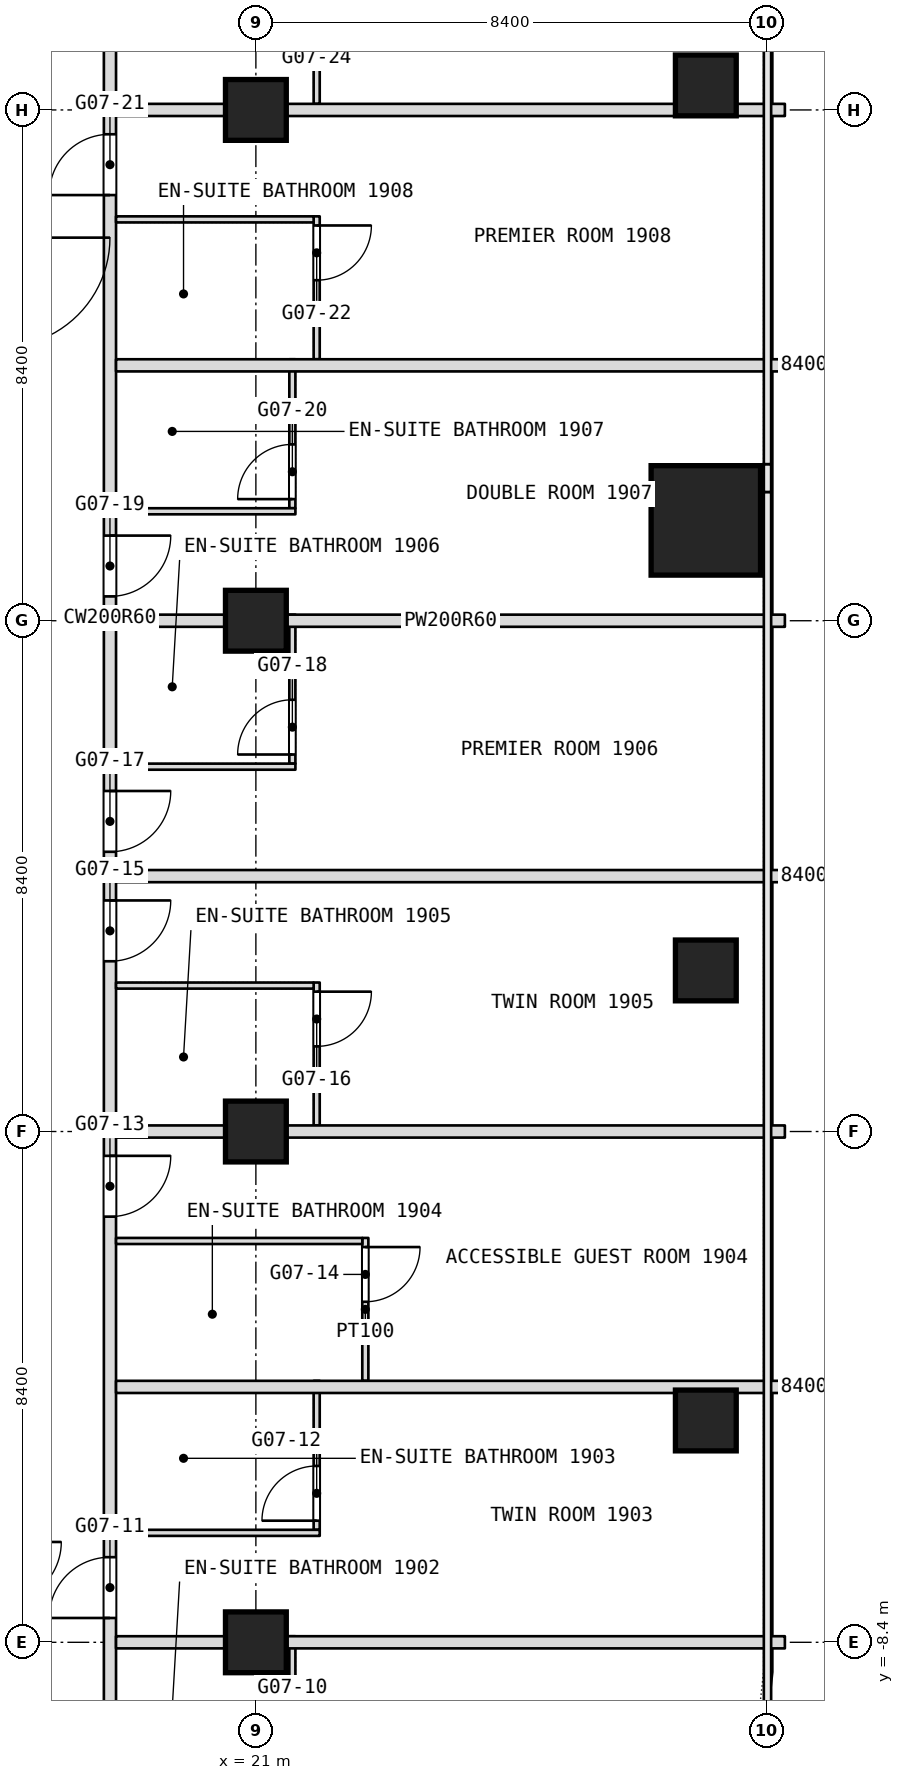
"""IFC4 building model, lengths in metres.
Left out: names, types, materials, properties, quantities, classifications, styles, units other than length and angle.
Written with IfcOpenShell. Run it as: python <this file> out.ifc"""

import sys

from ifc_helpers import new_model, si_unit, direction, frame, frame_2d, origin, origin_2d, place, context, subcontext, project, spatial, rectangle, extrude, element, fill, save


model = new_model("IFC4")
c1 = context("Model", 3, precision=1e-05, world=origin(), true_north=direction((0.0, 1.0)))
c2 = subcontext(c1, "Body", "Model", "MODEL_VIEW")
j1 = project(units=[si_unit("LENGTHUNIT", "METRE"), si_unit("PLANEANGLEUNIT", "RADIAN")], contexts=[c1])
p1 = place(None, origin())
s1 = spatial("IfcSite", under=j1, at=p1, CompositionType="ELEMENT")
p2 = place(p1, origin())
s2 = spatial("IfcBuilding", under=s1, at=p2, CompositionType="ELEMENT")
p3 = place(p2, frame((0.0, 0.0, 83.3)))
s3 = spatial("IfcBuildingStorey", under=s2, at=p3, CompositionType="ELEMENT", Elevation=83.3)
p4 = place(p3, frame((28.4, 10.05, 0.0), z_axis=(0.0, 0.0, 1.0), x_axis=(1.0, 0.0, 0.0)))
e1 = element("IfcColumn", 1, at=p4, inside=s3, PredefinedType="COLUMN", context=c2, shape_type="SweptSolid", body=[
    extrude(rectangle(XDim=1.8, YDim=1.8, at=origin_2d()), origin(), (0.0, 0.0, 1.0), 3.6),
])
for number, where, z_axis, x_axis in (
    (2, (21.0, -8.4, 0.0), (0.0, 0.0, 1.0), (1.0, 0.0, 0.0)),
    (3, (21.0, 0.0, 0.0), (0.0, 0.0, 1.0), (1.0, 0.0, 0.0)),
    (4, (21.0, 8.4, 0.0), (0.0, 0.0, 1.0), (1.0, 0.0, 0.0)),
    (5, (21.0, 16.8, 0.0), (0.0, 0.0, 1.0), (1.0, 0.0, 0.0)),
    (6, (28.4, 17.203, 0.0), (0.0, 0.0, 1.0), (1.0, 0.0, 0.0)),
    (7, (28.4, 2.649, 0.0), (0.0, 0.0, 1.0), (1.0, 0.0, 0.0)),
    (8, (28.4, -4.752, 0.0), (0.0, 0.0, 1.0), (1.0, 0.0, 0.0)),
):
    element("IfcColumn", number, at=place(p3, frame(where, z_axis=z_axis, x_axis=x_axis)), inside=s3, PredefinedType="COLUMN", context=c2, shape_type="SweptSolid", body=[
        extrude(rectangle(XDim=1.0, YDim=1.0, at=origin_2d()), origin(), (0.0, 0.0, 1.0), 3.6),
    ])
p5 = place(p3, frame((22.8, -4.1, 0.0), z_axis=(0.0, 0.0, 1.0), x_axis=(0.0, 1.0, 0.0)))
e9 = element("IfcWall", 9, at=p5, inside=s3, PredefinedType="PARTITIONING", context=c2, shape_type="SweptSolid", body=[
    extrude(rectangle(XDim=2.35, YDim=0.1, at=frame_2d((1.175, 0.0))), origin(), (0.0, 0.0, 1.0), 3.3),
])
p6 = place(p5, frame((1.3, 0.0, 0.0)))
e10 = element("IfcOpeningElement", 10, at=p6, cuts=e9, PredefinedType="OPENING", context=c2, shape_type="SweptSolid", body=[
    extrude(rectangle(XDim=0.9, YDim=2.1, at=frame_2d((0.45, 1.05))), frame((0.0, 0.05, 0.0), z_axis=(0.0, -1.0, 0.0), x_axis=(1.0, 0.0, 0.0)), (0.0, 0.0, 1.0), 0.1),
])
p7 = place(p3, frame((22.0, -6.55, 0.0), z_axis=(0.0, 0.0, 1.0), x_axis=(0.0, 1.0, 0.0)))
e11 = element("IfcWall", 11, at=p7, inside=s3, PredefinedType="PARTITIONING", context=c2, shape_type="SweptSolid", body=[
    extrude(rectangle(XDim=2.45, YDim=0.1, at=frame_2d((1.225, 0.0))), origin(), (0.0, 0.0, 1.0), 3.3),
])
p8 = place(p7, frame((0.15, 0.0, 0.0)))
e12 = element("IfcOpeningElement", 12, at=p8, cuts=e11, PredefinedType="OPENING", context=c2, shape_type="SweptSolid", body=[
    extrude(rectangle(XDim=0.9, YDim=2.1, at=frame_2d((0.45, 1.05))), frame((0.0, 0.05, 0.0), z_axis=(0.0, -1.0, 0.0), x_axis=(1.0, 0.0, 0.0)), (0.0, 0.0, 1.0), 0.1),
])
p9 = place(p3, frame((22.0, 0.1, 0.0), z_axis=(0.0, 0.0, 1.0), x_axis=(0.0, 1.0, 0.0)))
e13 = element("IfcWall", 13, at=p9, inside=s3, PredefinedType="PARTITIONING", context=c2, shape_type="SweptSolid", body=[
    extrude(rectangle(XDim=2.35, YDim=0.1, at=frame_2d((1.175, 0.0))), origin(), (0.0, 0.0, 1.0), 3.3),
])
p10 = place(p9, frame((1.3, 0.0, 0.0)))
e14 = element("IfcOpeningElement", 14, at=p10, cuts=e13, PredefinedType="OPENING", context=c2, shape_type="SweptSolid", body=[
    extrude(rectangle(XDim=0.9, YDim=2.1, at=frame_2d((0.45, 1.05))), frame((0.0, 0.05, 0.0), z_axis=(0.0, -1.0, 0.0), x_axis=(1.0, 0.0, 0.0)), (0.0, 0.0, 1.0), 0.1),
])
p11 = place(p3, frame((22.0, 12.7, 0.0), z_axis=(0.0, 0.0, 1.0), x_axis=(0.0, 1.0, 0.0)))
e15 = element("IfcWall", 15, at=p11, inside=s3, PredefinedType="PARTITIONING", context=c2, shape_type="SweptSolid", body=[
    extrude(rectangle(XDim=2.35, YDim=0.1, at=frame_2d((1.175, 0.0))), origin(), (0.0, 0.0, 1.0), 3.3),
])
p12 = place(p11, frame((1.3, 0.0, 0.0)))
e16 = element("IfcOpeningElement", 16, at=p12, cuts=e15, PredefinedType="OPENING", context=c2, shape_type="SweptSolid", body=[
    extrude(rectangle(XDim=0.9, YDim=2.1, at=frame_2d((0.45, 1.05))), frame((0.0, 0.05, 0.0), z_axis=(0.0, -1.0, 0.0), x_axis=(1.0, 0.0, 0.0)), (0.0, 0.0, 1.0), 0.1),
])
p13 = place(p3, frame((22.0, 16.9, 0.0), z_axis=(0.0, 0.0, 1.0), x_axis=(0.0, 1.0, 0.0)))
e17 = element("IfcWall", 17, at=p13, inside=s3, PredefinedType="PARTITIONING", context=c2, shape_type="SweptSolid", body=[
    extrude(rectangle(XDim=2.35, YDim=0.1, at=frame_2d((1.175, 0.0))), origin(), (0.0, 0.0, 1.0), 3.3),
])
p14 = place(p13, frame((1.3, 0.0, 0.0)))
e18 = element("IfcOpeningElement", 18, at=p14, cuts=e17, PredefinedType="OPENING", context=c2, shape_type="SweptSolid", body=[
    extrude(rectangle(XDim=0.9, YDim=2.1, at=frame_2d((0.45, 1.05))), frame((0.0, 0.05, 0.0), z_axis=(0.0, -1.0, 0.0), x_axis=(1.0, 0.0, 0.0)), (0.0, 0.0, 1.0), 0.1),
])
p15 = place(p3, frame((21.6, -10.75, 0.0), z_axis=(0.0, 0.0, 1.0), x_axis=(0.0, 1.0, 0.0)))
e19 = element("IfcWall", 19, at=p15, inside=s3, PredefinedType="PARTITIONING", context=c2, shape_type="SweptSolid", body=[
    extrude(rectangle(XDim=2.45, YDim=0.1, at=frame_2d((1.225, 0.0))), origin(), (0.0, 0.0, 1.0), 3.3),
])
p16 = place(p15, frame((0.15, 0.0, 0.0)))
e20 = element("IfcOpeningElement", 20, at=p16, cuts=e19, PredefinedType="OPENING", context=c2, shape_type="SweptSolid", body=[
    extrude(rectangle(XDim=0.9, YDim=2.1, at=frame_2d((0.45, 1.05))), frame((0.0, 0.05, 0.0), z_axis=(0.0, -1.0, 0.0), x_axis=(1.0, 0.0, 0.0)), (0.0, 0.0, 1.0), 0.1),
])
p17 = place(p3, frame((21.6, 6.05, 0.0), z_axis=(0.0, 0.0, 1.0), x_axis=(0.0, 1.0, 0.0)))
e21 = element("IfcWall", 21, at=p17, inside=s3, PredefinedType="PARTITIONING", context=c2, shape_type="SweptSolid", body=[
    extrude(rectangle(XDim=2.45, YDim=0.1, at=frame_2d((1.225, 0.0))), origin(), (0.0, 0.0, 1.0), 3.3),
])
p18 = place(p17, frame((0.15, 0.0, 0.0)))
e22 = element("IfcOpeningElement", 22, at=p18, cuts=e21, PredefinedType="OPENING", context=c2, shape_type="SweptSolid", body=[
    extrude(rectangle(XDim=0.9, YDim=2.1, at=frame_2d((0.45, 1.05))), frame((0.0, 0.05, 0.0), z_axis=(0.0, -1.0, 0.0), x_axis=(1.0, 0.0, 0.0)), (0.0, 0.0, 1.0), 0.1),
])
p19 = place(p3, frame((21.6, 10.25, 0.0), z_axis=(0.0, 0.0, 1.0), x_axis=(0.0, 1.0, 0.0)))
e23 = element("IfcWall", 23, at=p19, inside=s3, PredefinedType="PARTITIONING", context=c2, shape_type="SweptSolid", body=[
    extrude(rectangle(XDim=2.45, YDim=0.1, at=frame_2d((1.225, 0.0))), origin(), (0.0, 0.0, 1.0), 3.3),
])
p20 = place(p19, frame((0.15, 0.0, 0.0)))
e24 = element("IfcOpeningElement", 24, at=p20, cuts=e23, PredefinedType="OPENING", context=c2, shape_type="SweptSolid", body=[
    extrude(rectangle(XDim=0.9, YDim=2.1, at=frame_2d((0.45, 1.05))), frame((0.0, 0.05, 0.0), z_axis=(0.0, -1.0, 0.0), x_axis=(1.0, 0.0, 0.0)), (0.0, 0.0, 1.0), 0.1),
])
p21 = place(p3, frame((18.6, -16.665, 0.0), z_axis=(0.0, 0.0, 1.0), x_axis=(0.0, 1.0, 0.0)))
e25 = element("IfcWall", 25, at=p21, inside=s3, PredefinedType="PARTITIONING", context=c2, shape_type="SweptSolid", body=[
    extrude(rectangle(XDim=50.205, YDim=0.2, at=frame_2d((25.103, 0.0))), origin(), (0.0, 0.0, 1.0), 3.3),
])
p22 = place(p21, frame((2.991, 0.0, 0.0)))
e26 = element("IfcOpeningElement", 26, at=p22, cuts=e25, PredefinedType="OPENING", context=c2, shape_type="SweptSolid", body=[
    extrude(rectangle(XDim=1.0, YDim=2.1, at=frame_2d((0.5, 1.05))), frame((0.0, 0.1, 0.0), z_axis=(0.0, -1.0, 0.0), x_axis=(1.0, 0.0, 0.0)), (0.0, 0.0, 1.0), 0.2),
])
p23 = place(p21, frame((4.574, 0.0, 0.0)))
e27 = element("IfcOpeningElement", 27, at=p23, cuts=e25, PredefinedType="OPENING", context=c2, shape_type="SweptSolid", body=[
    extrude(rectangle(XDim=1.0, YDim=2.1, at=frame_2d((0.5, 1.05))), frame((0.0, 0.1, 0.0), z_axis=(0.0, -1.0, 0.0), x_axis=(1.0, 0.0, 0.0)), (0.0, 0.0, 1.0), 0.2),
])
p24 = place(p21, frame((8.665, 0.0, 0.0)))
e28 = element("IfcOpeningElement", 28, at=p24, cuts=e25, PredefinedType="OPENING", context=c2, shape_type="SweptSolid", body=[
    extrude(rectangle(XDim=1.0, YDim=2.1, at=frame_2d((0.5, 1.05))), frame((0.0, 0.1, 0.0), z_axis=(0.0, -1.0, 0.0), x_axis=(1.0, 0.0, 0.0)), (0.0, 0.0, 1.0), 0.2),
])
p25 = place(p21, frame((15.265, 0.0, 0.0)))
e29 = element("IfcOpeningElement", 29, at=p25, cuts=e25, PredefinedType="OPENING", context=c2, shape_type="SweptSolid", body=[
    extrude(rectangle(XDim=1.0, YDim=2.1, at=frame_2d((0.5, 1.05))), frame((0.0, 0.1, 0.0), z_axis=(0.0, -1.0, 0.0), x_axis=(1.0, 0.0, 0.0)), (0.0, 0.0, 1.0), 0.2),
])
p26 = place(p21, frame((19.465, 0.0, 0.0)))
e30 = element("IfcOpeningElement", 30, at=p26, cuts=e25, PredefinedType="OPENING", context=c2, shape_type="SweptSolid", body=[
    extrude(rectangle(XDim=1.0, YDim=2.1, at=frame_2d((0.5, 1.05))), frame((0.0, 0.1, 0.0), z_axis=(0.0, -1.0, 0.0), x_axis=(1.0, 0.0, 0.0)), (0.0, 0.0, 1.0), 0.2),
])
p27 = place(p21, frame((21.265, 0.0, 0.0)))
e31 = element("IfcOpeningElement", 31, at=p27, cuts=e25, PredefinedType="OPENING", context=c2, shape_type="SweptSolid", body=[
    extrude(rectangle(XDim=1.0, YDim=2.1, at=frame_2d((0.5, 1.05))), frame((0.0, 0.1, 0.0), z_axis=(0.0, -1.0, 0.0), x_axis=(1.0, 0.0, 0.0)), (0.0, 0.0, 1.0), 0.2),
])
p28 = place(p21, frame((25.465, 0.0, 0.0)))
e32 = element("IfcOpeningElement", 32, at=p28, cuts=e25, PredefinedType="OPENING", context=c2, shape_type="SweptSolid", body=[
    extrude(rectangle(XDim=1.0, YDim=2.1, at=frame_2d((0.5, 1.05))), frame((0.0, 0.1, 0.0), z_axis=(0.0, -1.0, 0.0), x_axis=(1.0, 0.0, 0.0)), (0.0, 0.0, 1.0), 0.2),
])
p29 = place(p21, frame((32.065, 0.0, 0.0)))
e33 = element("IfcOpeningElement", 33, at=p29, cuts=e25, PredefinedType="OPENING", context=c2, shape_type="SweptSolid", body=[
    extrude(rectangle(XDim=1.0, YDim=2.1, at=frame_2d((0.5, 1.05))), frame((0.0, 0.1, 0.0), z_axis=(0.0, -1.0, 0.0), x_axis=(1.0, 0.0, 0.0)), (0.0, 0.0, 1.0), 0.2),
])
p30 = place(p21, frame((36.265, 0.0, 0.0)))
e34 = element("IfcOpeningElement", 34, at=p30, cuts=e25, PredefinedType="OPENING", context=c2, shape_type="SweptSolid", body=[
    extrude(rectangle(XDim=1.0, YDim=2.1, at=frame_2d((0.5, 1.05))), frame((0.0, 0.1, 0.0), z_axis=(0.0, -1.0, 0.0), x_axis=(1.0, 0.0, 0.0)), (0.0, 0.0, 1.0), 0.2),
])
p31 = place(p21, frame((38.065, 0.0, 0.0)))
e35 = element("IfcOpeningElement", 35, at=p31, cuts=e25, PredefinedType="OPENING", context=c2, shape_type="SweptSolid", body=[
    extrude(rectangle(XDim=1.0, YDim=2.1, at=frame_2d((0.5, 1.05))), frame((0.0, 0.1, 0.0), z_axis=(0.0, -1.0, 0.0), x_axis=(1.0, 0.0, 0.0)), (0.0, 0.0, 1.0), 0.2),
])
p32 = place(p21, frame((42.265, 0.0, 0.0)))
e36 = element("IfcOpeningElement", 36, at=p32, cuts=e25, PredefinedType="OPENING", context=c2, shape_type="SweptSolid", body=[
    extrude(rectangle(XDim=1.0, YDim=2.1, at=frame_2d((0.5, 1.05))), frame((0.0, 0.1, 0.0), z_axis=(0.0, -1.0, 0.0), x_axis=(1.0, 0.0, 0.0)), (0.0, 0.0, 1.0), 0.2),
])
p33 = place(p21, frame((46.365, 0.0, 0.0)))
e37 = element("IfcOpeningElement", 37, at=p33, cuts=e25, PredefinedType="OPENING", context=c2, shape_type="SweptSolid", body=[
    extrude(rectangle(XDim=1.0, YDim=2.1, at=frame_2d((0.5, 1.05))), frame((0.0, 0.1, 0.0), z_axis=(0.0, -1.0, 0.0), x_axis=(1.0, 0.0, 0.0)), (0.0, 0.0, 1.0), 0.2),
])
p34 = place(p3, frame((18.7, -8.4, 0.0), z_axis=(0.0, 0.0, 1.0), x_axis=(1.0, 0.0, 0.0)))
e38 = element("IfcWall", 38, at=p34, inside=s3, PredefinedType="PARTITIONING", context=c2, shape_type="SweptSolid", body=[
    extrude(rectangle(XDim=11.0, YDim=0.2, at=frame_2d((5.5, 0.0))), origin(), (0.0, 0.0, 1.0), 2.8),
])
p35 = place(p3, frame((18.7, -6.6, 0.0), z_axis=(0.0, 0.0, 1.0), x_axis=(1.0, 0.0, 0.0)))
e39 = element("IfcWall", 39, at=p35, inside=s3, PredefinedType="PARTITIONING", context=c2, shape_type="SweptSolid", body=[
    extrude(rectangle(XDim=3.35, YDim=0.1, at=frame_2d((1.675, 0.0))), origin(), (0.0, 0.0, 1.0), 3.3),
])
p36 = place(p3, frame((18.7, -4.2, 0.0), z_axis=(0.0, 0.0, 1.0), x_axis=(1.0, 0.0, 0.0)))
e40 = element("IfcWall", 40, at=p36, inside=s3, PredefinedType="PARTITIONING", context=c2, shape_type="SweptSolid", body=[
    extrude(rectangle(XDim=11.0, YDim=0.2, at=frame_2d((5.5, 0.0))), origin(), (0.0, 0.0, 1.0), 3.3),
])
p37 = place(p3, frame((18.7, -1.8, 0.0), z_axis=(0.0, 0.0, 1.0), x_axis=(1.0, 0.0, 0.0)))
e41 = element("IfcWall", 41, at=p37, inside=s3, PredefinedType="PARTITIONING", context=c2, shape_type="SweptSolid", body=[
    extrude(rectangle(XDim=4.05, YDim=0.1, at=frame_2d((2.025, 0.0))), origin(), (0.0, 0.0, 1.0), 3.3),
])
p38 = place(p3, frame((18.7, 0.0, 0.0), z_axis=(0.0, 0.0, 1.0), x_axis=(1.0, 0.0, 0.0)))
e42 = element("IfcWall", 42, at=p38, inside=s3, PredefinedType="PARTITIONING", context=c2, shape_type="SweptSolid", body=[
    extrude(rectangle(XDim=11.0, YDim=0.2, at=frame_2d((5.5, 0.0))), origin(), (0.0, 0.0, 1.0), 2.8),
])
p39 = place(p3, frame((18.7, 2.4, 0.0), z_axis=(0.0, 0.0, 1.0), x_axis=(1.0, 0.0, 0.0)))
e43 = element("IfcWall", 43, at=p39, inside=s3, PredefinedType="PARTITIONING", context=c2, shape_type="SweptSolid", body=[
    extrude(rectangle(XDim=3.25, YDim=0.1, at=frame_2d((1.625, 0.0))), origin(), (0.0, 0.0, 1.0), 3.3),
])
p40 = place(p3, frame((18.7, 4.2, 0.0), z_axis=(0.0, 0.0, 1.0), x_axis=(1.0, 0.0, 0.0)))
e44 = element("IfcWall", 44, at=p40, inside=s3, PredefinedType="PARTITIONING", context=c2, shape_type="SweptSolid", body=[
    extrude(rectangle(XDim=11.0, YDim=0.2, at=frame_2d((5.5, 0.0))), origin(), (0.0, 0.0, 1.0), 3.3),
])
p41 = place(p3, frame((18.7, 6.0, 0.0), z_axis=(0.0, 0.0, 1.0), x_axis=(1.0, 0.0, 0.0)))
e45 = element("IfcWall", 45, at=p41, inside=s3, PredefinedType="PARTITIONING", context=c2, shape_type="SweptSolid", body=[
    extrude(rectangle(XDim=2.95, YDim=0.1, at=frame_2d((1.475, 0.0))), origin(), (0.0, 0.0, 1.0), 3.3),
])
p42 = place(p3, frame((18.7, 8.4, 0.0), z_axis=(0.0, 0.0, 1.0), x_axis=(1.0, 0.0, 0.0)))
e46 = element("IfcWall", 46, at=p42, inside=s3, PredefinedType="PARTITIONING", context=c2, shape_type="SweptSolid", body=[
    extrude(rectangle(XDim=11.0, YDim=0.2, at=frame_2d((5.5, 0.0))), origin(), (0.0, 0.0, 1.0), 2.8),
])
p43 = place(p3, frame((18.7, 10.2, 0.0), z_axis=(0.0, 0.0, 1.0), x_axis=(1.0, 0.0, 0.0)))
e47 = element("IfcWall", 47, at=p43, inside=s3, PredefinedType="PARTITIONING", context=c2, shape_type="SweptSolid", body=[
    extrude(rectangle(XDim=2.95, YDim=0.1, at=frame_2d((1.475, 0.0))), origin(), (0.0, 0.0, 1.0), 3.3),
])
p44 = place(p3, frame((18.7, 12.6, 0.0), z_axis=(0.0, 0.0, 1.0), x_axis=(1.0, 0.0, 0.0)))
e48 = element("IfcWall", 48, at=p44, inside=s3, PredefinedType="PARTITIONING", context=c2, shape_type="SweptSolid", body=[
    extrude(rectangle(XDim=11.0, YDim=0.2, at=frame_2d((5.5, 0.0))), origin(), (0.0, 0.0, 1.0), 3.3),
])
p45 = place(p3, frame((18.7, 15.0, 0.0), z_axis=(0.0, 0.0, 1.0), x_axis=(1.0, 0.0, 0.0)))
e49 = element("IfcWall", 49, at=p45, inside=s3, PredefinedType="PARTITIONING", context=c2, shape_type="SweptSolid", body=[
    extrude(rectangle(XDim=3.25, YDim=0.1, at=frame_2d((1.625, 0.0))), origin(), (0.0, 0.0, 1.0), 3.3),
])
p46 = place(p3, frame((18.7, 16.8, 0.0), z_axis=(0.0, 0.0, 1.0), x_axis=(1.0, 0.0, 0.0)))
e50 = element("IfcWall", 50, at=p46, inside=s3, PredefinedType="PARTITIONING", context=c2, shape_type="SweptSolid", body=[
    extrude(rectangle(XDim=11.0, YDim=0.2, at=frame_2d((5.5, 0.0))), origin(), (0.0, 0.0, 1.0), 2.8),
])
p47 = place(p6, origin())
e51 = element("IfcDoor", 51, at=p47, inside=s3, OperationType="SINGLE_SWING_RIGHT", PredefinedType="DOOR", context=c2, shape_type="SweptSolid", body=[
    extrude(rectangle(XDim=0.9, YDim=2.1, at=frame_2d((0.45, 1.05))), frame((0.0, 0.025, 0.0), z_axis=(0.0, -1.0, 0.0), x_axis=(1.0, 0.0, 0.0)), (0.0, 0.0, 1.0), 0.05),
])
fill(e10, e51)
p48 = place(p8, origin())
e52 = element("IfcDoor", 52, at=p48, inside=s3, OperationType="SINGLE_SWING_LEFT", PredefinedType="DOOR", context=c2, shape_type="SweptSolid", body=[
    extrude(rectangle(XDim=0.9, YDim=2.1, at=frame_2d((0.45, 1.05))), frame((0.0, 0.025, 0.0), z_axis=(0.0, -1.0, 0.0), x_axis=(1.0, 0.0, 0.0)), (0.0, 0.0, 1.0), 0.05),
])
fill(e12, e52)
p49 = place(p10, origin())
e53 = element("IfcDoor", 53, at=p49, inside=s3, OperationType="SINGLE_SWING_RIGHT", PredefinedType="DOOR", context=c2, shape_type="SweptSolid", body=[
    extrude(rectangle(XDim=0.9, YDim=2.1, at=frame_2d((0.45, 1.05))), frame((0.0, 0.025, 0.0), z_axis=(0.0, -1.0, 0.0), x_axis=(1.0, 0.0, 0.0)), (0.0, 0.0, 1.0), 0.05),
])
fill(e14, e53)
p50 = place(p12, origin())
e54 = element("IfcDoor", 54, at=p50, inside=s3, OperationType="SINGLE_SWING_RIGHT", PredefinedType="DOOR", context=c2, shape_type="SweptSolid", body=[
    extrude(rectangle(XDim=0.9, YDim=2.1, at=frame_2d((0.45, 1.05))), frame((0.0, 0.025, 0.0), z_axis=(0.0, -1.0, 0.0), x_axis=(1.0, 0.0, 0.0)), (0.0, 0.0, 1.0), 0.05),
])
fill(e16, e54)
p51 = place(p18, origin())
e55 = element("IfcDoor", 55, at=p51, inside=s3, OperationType="SINGLE_SWING_LEFT", PredefinedType="DOOR", context=c2, shape_type="SweptSolid", body=[
    extrude(rectangle(XDim=0.9, YDim=2.1, at=frame_2d((0.45, 1.05))), frame((0.0, 0.025, 0.0), z_axis=(0.0, -1.0, 0.0), x_axis=(1.0, 0.0, 0.0)), (0.0, 0.0, 1.0), 0.05),
])
fill(e22, e55)
p52 = place(p20, origin())
e56 = element("IfcDoor", 56, at=p52, inside=s3, OperationType="SINGLE_SWING_LEFT", PredefinedType="DOOR", context=c2, shape_type="SweptSolid", body=[
    extrude(rectangle(XDim=0.9, YDim=2.1, at=frame_2d((0.45, 1.05))), frame((0.0, 0.025, 0.0), z_axis=(0.0, -1.0, 0.0), x_axis=(1.0, 0.0, 0.0)), (0.0, 0.0, 1.0), 0.05),
])
fill(e24, e56)
p53 = place(p24, origin())
e57 = element("IfcDoor", 57, at=p53, inside=s3, OperationType="SINGLE_SWING_LEFT", PredefinedType="DOOR", context=c2, shape_type="SweptSolid", body=[
    extrude(rectangle(XDim=1.0, YDim=2.1, at=frame_2d((0.5, 1.05))), frame((0.0, 0.025, 0.0), z_axis=(0.0, -1.0, 0.0), x_axis=(1.0, 0.0, 0.0)), (0.0, 0.0, 1.0), 0.05),
])
fill(e28, e57)
p54 = place(p25, origin())
e58 = element("IfcDoor", 58, at=p54, inside=s3, OperationType="SINGLE_SWING_LEFT", PredefinedType="DOOR", context=c2, shape_type="SweptSolid", body=[
    extrude(rectangle(XDim=1.0, YDim=2.1, at=frame_2d((0.5, 1.05))), frame((0.0, 0.025, 0.0), z_axis=(0.0, -1.0, 0.0), x_axis=(1.0, 0.0, 0.0)), (0.0, 0.0, 1.0), 0.05),
])
fill(e29, e58)
p55 = place(p26, origin())
e59 = element("IfcDoor", 59, at=p55, inside=s3, OperationType="SINGLE_SWING_LEFT", PredefinedType="DOOR", context=c2, shape_type="SweptSolid", body=[
    extrude(rectangle(XDim=1.0, YDim=2.1, at=frame_2d((0.5, 1.05))), frame((0.0, 0.025, 0.0), z_axis=(0.0, -1.0, 0.0), x_axis=(1.0, 0.0, 0.0)), (0.0, 0.0, 1.0), 0.05),
])
fill(e30, e59)
p56 = place(p27, origin())
e60 = element("IfcDoor", 60, at=p56, inside=s3, OperationType="SINGLE_SWING_LEFT", PredefinedType="DOOR", context=c2, shape_type="SweptSolid", body=[
    extrude(rectangle(XDim=1.0, YDim=2.1, at=frame_2d((0.5, 1.05))), frame((0.0, 0.025, 0.0), z_axis=(0.0, -1.0, 0.0), x_axis=(1.0, 0.0, 0.0)), (0.0, 0.0, 1.0), 0.05),
])
fill(e31, e60)
p57 = place(p28, origin())
e61 = element("IfcDoor", 61, at=p57, inside=s3, OperationType="SINGLE_SWING_LEFT", PredefinedType="DOOR", context=c2, shape_type="SweptSolid", body=[
    extrude(rectangle(XDim=1.0, YDim=2.1, at=frame_2d((0.5, 1.05))), frame((0.0, 0.025, 0.0), z_axis=(0.0, -1.0, 0.0), x_axis=(1.0, 0.0, 0.0)), (0.0, 0.0, 1.0), 0.05),
])
fill(e32, e61)
p58 = place(p29, origin())
e62 = element("IfcDoor", 62, at=p58, inside=s3, OperationType="SINGLE_SWING_LEFT", PredefinedType="DOOR", context=c2, shape_type="SweptSolid", body=[
    extrude(rectangle(XDim=1.0, YDim=2.1, at=frame_2d((0.5, 1.05))), frame((0.0, 0.025, 0.0), z_axis=(0.0, -1.0, 0.0), x_axis=(1.0, 0.0, 0.0)), (0.0, 0.0, 1.0), 0.05),
])
fill(e33, e62)
save(model, sys.argv[1])
